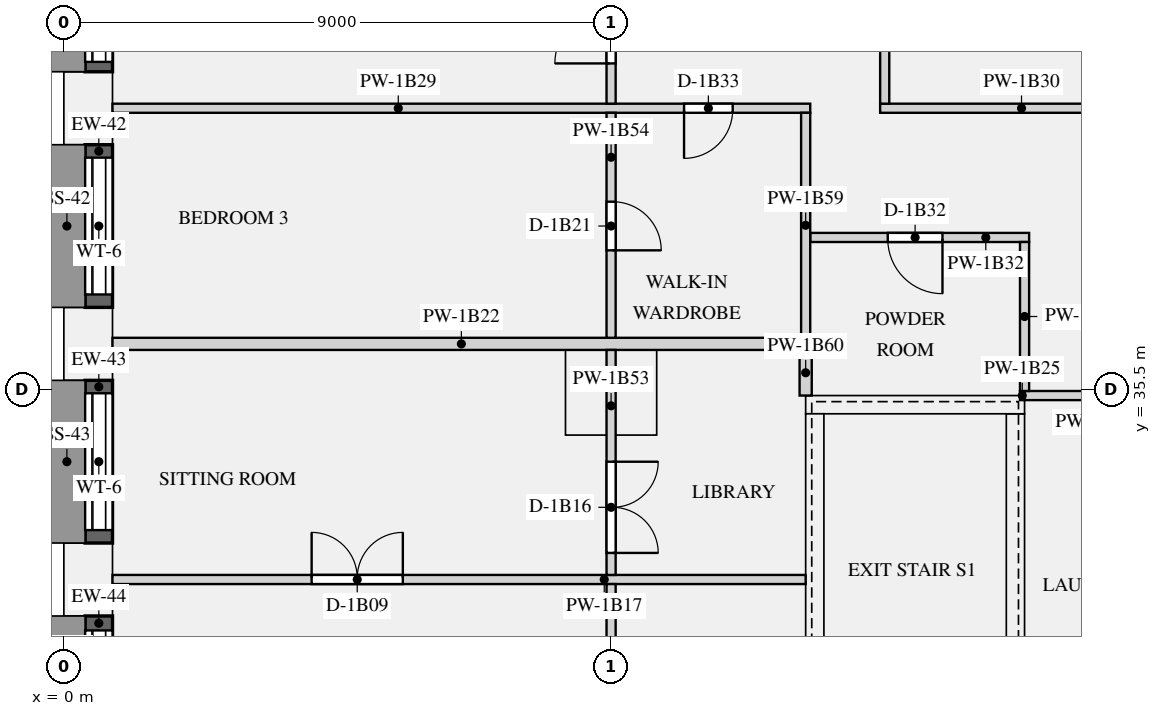
"""IFC4 building model, lengths in metres.
Left out: names, types, materials, properties, quantities, classifications, styles, units other than length and angle.
Written with IfcOpenShell. Run it as: python <this file> out.ifc"""

import sys

from ifc_helpers import new_model, si_unit, direction, frame, frame_2d, origin, origin_2d, place, context, subcontext, project, spatial, rectangle, extrude, element, fill, save


model = new_model("IFC4")
c1 = context("Model", 3, precision=1e-05, world=origin(), true_north=direction((0.0, 1.0)))
c2 = subcontext(c1, "Body", "Model", "MODEL_VIEW")
j1 = project(units=[si_unit("LENGTHUNIT", "METRE"), si_unit("PLANEANGLEUNIT", "RADIAN")], contexts=[c1])
p1 = place(None, origin())
s1 = spatial("IfcSite", under=j1, at=p1, CompositionType="ELEMENT")
p2 = place(p1, origin())
s2 = spatial("IfcBuilding", under=s1, at=p2, CompositionType="ELEMENT")
p3 = place(p2, frame((0.0, 0.0, 28.95)))
s3 = spatial("IfcBuildingStorey", under=s2, at=p3, CompositionType="ELEMENT", Elevation=28.95)
for number, where, z_axis, x_axis in (
    (1, (0.4, 40.125, 0.0), (0.0, 0.0, 1.0), (0.0, -1.0, 0.0)),
    (2, (0.4, 36.25, 0.0), (0.0, 0.0, 1.0), (0.0, -1.0, 0.0)),
    (3, (0.4, 32.375, 0.0), (0.0, 0.0, 1.0), (0.0, -1.0, 0.0)),
):
    element("IfcColumn", number, at=place(p3, frame(where, z_axis=z_axis, x_axis=x_axis)), inside=s3, PredefinedType="USERDEFINED", context=c2, shape_type="SweptSolid", body=[
        extrude(rectangle(XDim=1.2, YDim=0.8, at=origin_2d()), origin(), (0.0, 0.0, 1.0), 3.15),
    ])
p4 = place(p3, frame((9.0, 35.5, 0.0), z_axis=(0.0, 0.0, 1.0), x_axis=(1.0, 0.0, 0.0)))
e4 = element("IfcColumn", 4, at=p4, inside=s3, PredefinedType="COLUMN", context=c2, shape_type="SweptSolid", body=[
    extrude(rectangle(XDim=1.5, YDim=1.5, at=origin_2d()), origin(), (0.0, 0.0, 1.0), 3.15),
])
p5 = place(p3, frame((12.2, 35.25, 0.0), z_axis=(0.0, 0.0, 1.0), x_axis=(1.0, 0.0, 0.0)))
e5 = element("IfcWall", 5, at=p5, inside=s3, PredefinedType="SHEAR", context=c2, shape_type="SweptSolid", body=[
    extrude(rectangle(XDim=3.6, YDim=0.3, at=frame_2d((1.8, 0.0))), origin(), (0.0, 0.0, 1.0), 3.15),
])
for number, where, z_axis, x_axis in (
    (6, (12.35, 27.3, 0.0), (0.0, 0.0, 1.0), (0.0, 1.0, 0.0)),
    (7, (15.65, 27.3, 0.0), (0.0, 0.0, 1.0), (0.0, 1.0, 0.0)),
):
    element("IfcWall", number, at=place(p3, frame(where, z_axis=z_axis, x_axis=x_axis)), inside=s3, PredefinedType="SHEAR", context=c2, shape_type="SweptSolid", body=[
        extrude(rectangle(XDim=7.8, YDim=0.3, at=frame_2d((3.9, 0.0))), origin(), (0.0, 0.0, 1.0), 3.15),
    ])
p6 = place(p3, frame((0.575, 42.8, 0.9), z_axis=(0.0, 0.0, 1.0), x_axis=(0.0, -1.0, 0.0)))
e8 = element("IfcWall", 8, at=p6, inside=s3, PredefinedType="SOLIDWALL", context=c2, shape_type="SweptSolid", body=[
    extrude(rectangle(XDim=2.075, YDim=0.45, at=frame_2d((1.038, 0.0))), origin(), (0.0, 0.0, 1.0), 1.93),
])
p7 = place(p6, frame((0.163, 0.0, 0.15)))
e9 = element("IfcOpeningElement", 9, at=p7, cuts=e8, PredefinedType="OPENING", context=c2, shape_type="SweptSolid", body=[
    extrude(rectangle(XDim=1.75, YDim=1.5, at=frame_2d((0.875, 0.75))), frame((0.0, 0.235, 0.0), z_axis=(0.0, -1.0, 0.0), x_axis=(1.0, 0.0, 0.0)), (0.0, 0.0, 1.0), 0.47),
])
p8 = place(p3, frame((0.575, 39.525, 0.9), z_axis=(0.0, 0.0, 1.0), x_axis=(0.0, -1.0, 0.0)))
e10 = element("IfcWall", 10, at=p8, inside=s3, PredefinedType="SOLIDWALL", context=c2, shape_type="SweptSolid", body=[
    extrude(rectangle(XDim=2.675, YDim=0.45, at=frame_2d((1.337, 0.0))), origin(), (0.0, 0.0, 1.0), 1.93),
])
p9 = place(p8, frame((0.212, 0.0, 0.15)))
e11 = element("IfcOpeningElement", 11, at=p9, cuts=e10, PredefinedType="OPENING", context=c2, shape_type="SweptSolid", body=[
    extrude(rectangle(XDim=2.25, YDim=1.5, at=frame_2d((1.125, 0.75))), frame((0.0, 0.235, 0.0), z_axis=(0.0, -1.0, 0.0), x_axis=(1.0, 0.0, 0.0)), (0.0, 0.0, 1.0), 0.47),
])
p10 = place(p3, frame((0.575, 35.65, 0.9), z_axis=(0.0, 0.0, 1.0), x_axis=(0.0, -1.0, 0.0)))
e12 = element("IfcWall", 12, at=p10, inside=s3, PredefinedType="SOLIDWALL", context=c2, shape_type="SweptSolid", body=[
    extrude(rectangle(XDim=2.675, YDim=0.45, at=frame_2d((1.337, 0.0))), origin(), (0.0, 0.0, 1.0), 1.93),
])
p11 = place(p10, frame((0.212, 0.0, 0.15)))
e13 = element("IfcOpeningElement", 13, at=p11, cuts=e12, PredefinedType="OPENING", context=c2, shape_type="SweptSolid", body=[
    extrude(rectangle(XDim=2.25, YDim=1.5, at=frame_2d((1.125, 0.75))), frame((0.0, 0.235, 0.0), z_axis=(0.0, -1.0, 0.0), x_axis=(1.0, 0.0, 0.0)), (0.0, 0.0, 1.0), 0.47),
])
p12 = place(p3, frame((0.575, 31.775, 0.9), z_axis=(0.0, 0.0, 1.0), x_axis=(0.0, -1.0, 0.0)))
e14 = element("IfcWall", 14, at=p12, inside=s3, PredefinedType="SOLIDWALL", context=c2, shape_type="SweptSolid", body=[
    extrude(rectangle(XDim=2.475, YDim=0.45, at=frame_2d((1.237, 0.0))), origin(), (0.0, 0.0, 1.0), 1.93),
])
p13 = place(p12, frame((0.238, 0.0, 0.15)))
e15 = element("IfcOpeningElement", 15, at=p13, cuts=e14, PredefinedType="OPENING", context=c2, shape_type="SweptSolid", body=[
    extrude(rectangle(XDim=2.0, YDim=1.5, at=frame_2d((1.0, 0.75))), frame((0.0, 0.235, 0.0), z_axis=(0.0, -1.0, 0.0), x_axis=(1.0, 0.0, 0.0)), (0.0, 0.0, 1.0), 0.47),
])
p14 = place(p3, frame((0.8, 32.375, 0.0), z_axis=(0.0, 0.0, 1.0), x_axis=(1.0, 0.0, 0.0)))
e16 = element("IfcWall", 16, at=p14, inside=s3, PredefinedType="PARTITIONING", context=c2, shape_type="SweptSolid", body=[
    extrude(rectangle(XDim=11.4, YDim=0.15, at=frame_2d((5.7, 0.0))), origin(), (0.0, 0.0, 1.0), 2.83),
])
p15 = place(p14, frame((3.275, 0.0, 0.0)))
e17 = element("IfcOpeningElement", 17, at=p15, cuts=e16, PredefinedType="OPENING", context=c2, shape_type="SweptSolid", body=[
    extrude(rectangle(XDim=1.5, YDim=2.1, at=frame_2d((0.75, 1.05))), frame((0.0, 0.085, 0.0), z_axis=(0.0, -1.0, 0.0), x_axis=(1.0, 0.0, 0.0)), (0.0, 0.0, 1.0), 0.17),
])
p16 = place(p3, frame((0.8, 36.25, 0.0), z_axis=(0.0, 0.0, 1.0), x_axis=(1.0, 0.0, 0.0)))
e18 = element("IfcWall", 18, at=p16, inside=s3, PredefinedType="PARTITIONING", context=c2, shape_type="SweptSolid", body=[
    extrude(rectangle(XDim=11.475, YDim=0.2, at=frame_2d((5.737, 0.0))), origin(), (0.0, 0.0, 1.0), 2.83),
])
p17 = place(p3, frame((15.725, 35.4, 0.0), z_axis=(0.0, 0.0, 1.0), x_axis=(1.0, 0.0, 0.0)))
e19 = element("IfcWall", 19, at=p17, inside=s3, PredefinedType="PARTITIONING", context=c2, shape_type="SweptSolid", body=[
    extrude(rectangle(XDim=0.075, YDim=0.15, at=frame_2d((0.038, 0.0))), origin(), (0.0, 0.0, 1.0), 2.83),
])
p18 = place(p3, frame((15.8, 35.4, 0.0), z_axis=(0.0, 0.0, 1.0), x_axis=(1.0, 0.0, 0.0)))
e20 = element("IfcWall", 20, at=p18, inside=s3, PredefinedType="PARTITIONING", context=c2, shape_type="SweptSolid", body=[
    extrude(rectangle(XDim=2.275, YDim=0.15, at=frame_2d((1.137, 0.0))), origin(), (0.0, 0.0, 1.0), 2.83),
])
p19 = place(p3, frame((0.8, 40.125, 0.0), z_axis=(0.0, 0.0, 1.0), x_axis=(1.0, 0.0, 0.0)))
e21 = element("IfcWall", 21, at=p19, inside=s3, PredefinedType="PARTITIONING", context=c2, shape_type="SweptSolid", body=[
    extrude(rectangle(XDim=11.475, YDim=0.15, at=frame_2d((5.737, 0.0))), origin(), (0.0, 0.0, 1.0), 2.83),
])
p20 = place(p19, frame((9.4, 0.0, 0.0)))
e22 = element("IfcOpeningElement", 22, at=p20, cuts=e21, PredefinedType="OPENING", context=c2, shape_type="SweptSolid", body=[
    extrude(rectangle(XDim=0.8, YDim=2.1, at=frame_2d((0.4, 1.05))), frame((0.0, 0.085, 0.0), z_axis=(0.0, -1.0, 0.0), x_axis=(1.0, 0.0, 0.0)), (0.0, 0.0, 1.0), 0.17),
])
p21 = place(p3, frame((13.425, 40.125, 0.0), z_axis=(0.0, 0.0, 1.0), x_axis=(1.0, 0.0, 0.0)))
e23 = element("IfcWall", 23, at=p21, inside=s3, PredefinedType="PARTITIONING", context=c2, shape_type="SweptSolid", body=[
    extrude(rectangle(XDim=4.65, YDim=0.15, at=frame_2d((2.325, 0.0))), origin(), (0.0, 0.0, 1.0), 2.83),
])
p22 = place(p3, frame((12.275, 38.0, 0.0), z_axis=(0.0, 0.0, 1.0), x_axis=(1.0, 0.0, 0.0)))
e24 = element("IfcWall", 24, at=p22, inside=s3, PredefinedType="PARTITIONING", context=c2, shape_type="SweptSolid", body=[
    extrude(rectangle(XDim=3.6, YDim=0.15, at=frame_2d((1.8, 0.0))), origin(), (0.0, 0.0, 1.0), 2.83),
])
p23 = place(p22, frame((1.275, 0.0, 0.0)))
e25 = element("IfcOpeningElement", 25, at=p23, cuts=e24, PredefinedType="OPENING", context=c2, shape_type="SweptSolid", body=[
    extrude(rectangle(XDim=0.9, YDim=2.1, at=frame_2d((0.45, 1.05))), frame((0.0, 0.085, 0.0), z_axis=(0.0, -1.0, 0.0), x_axis=(1.0, 0.0, 0.0)), (0.0, 0.0, 1.0), 0.17),
])
p24 = place(p3, frame((9.0, 24.075, 0.0), z_axis=(0.0, 0.0, 1.0), x_axis=(0.0, 1.0, 0.0)))
e26 = element("IfcWall", 26, at=p24, inside=s3, PredefinedType="PARTITIONING", context=c2, shape_type="SweptSolid", body=[
    extrude(rectangle(XDim=8.225, YDim=0.15, at=frame_2d((4.113, 0.0))), origin(), (0.0, 0.0, 1.0), 2.83),
])
p25 = place(p24, frame((2.1, 0.0, 0.0)))
e27 = element("IfcOpeningElement", 27, at=p25, cuts=e26, PredefinedType="OPENING", context=c2, shape_type="SweptSolid", body=[
    extrude(rectangle(XDim=0.9, YDim=2.1, at=frame_2d((0.45, 1.05))), frame((0.0, 0.085, 0.0), z_axis=(0.0, -1.0, 0.0), x_axis=(1.0, 0.0, 0.0)), (0.0, 0.0, 1.0), 0.17),
])
p26 = place(p3, frame((9.0, 32.45, 0.0), z_axis=(0.0, 0.0, 1.0), x_axis=(0.0, 1.0, 0.0)))
e28 = element("IfcWall", 28, at=p26, inside=s3, PredefinedType="PARTITIONING", context=c2, shape_type="SweptSolid", body=[
    extrude(rectangle(XDim=3.7, YDim=0.15, at=frame_2d((1.85, 0.0))), origin(), (0.0, 0.0, 1.0), 2.83),
])
p27 = place(p26, frame((0.362, 0.0, 0.0)))
e29 = element("IfcOpeningElement", 29, at=p27, cuts=e28, PredefinedType="OPENING", context=c2, shape_type="SweptSolid", body=[
    extrude(rectangle(XDim=1.5, YDim=2.1, at=frame_2d((0.75, 1.05))), frame((0.0, 0.085, 0.0), z_axis=(0.0, -1.0, 0.0), x_axis=(1.0, 0.0, 0.0)), (0.0, 0.0, 1.0), 0.17),
])
p28 = place(p3, frame((9.0, 36.35, 0.0), z_axis=(0.0, 0.0, 1.0), x_axis=(0.0, 1.0, 0.0)))
e30 = element("IfcWall", 30, at=p28, inside=s3, PredefinedType="PARTITIONING", context=c2, shape_type="SweptSolid", body=[
    extrude(rectangle(XDim=3.7, YDim=0.15, at=frame_2d((1.85, 0.0))), origin(), (0.0, 0.0, 1.0), 2.83),
])
p29 = place(p28, frame((1.438, 0.0, 0.0)))
e31 = element("IfcOpeningElement", 31, at=p29, cuts=e30, PredefinedType="OPENING", context=c2, shape_type="SweptSolid", body=[
    extrude(rectangle(XDim=0.8, YDim=2.1, at=frame_2d((0.4, 1.05))), frame((0.0, 0.085, 0.0), z_axis=(0.0, -1.0, 0.0), x_axis=(1.0, 0.0, 0.0)), (0.0, 0.0, 1.0), 0.17),
])
p30 = place(p3, frame((9.0, 40.2, 0.0), z_axis=(0.0, 0.0, 1.0), x_axis=(0.0, 1.0, 0.0)))
e32 = element("IfcWall", 32, at=p30, inside=s3, PredefinedType="PARTITIONING", context=c2, shape_type="SweptSolid", body=[
    extrude(rectangle(XDim=7.5, YDim=0.15, at=frame_2d((3.75, 0.0))), origin(), (0.0, 0.0, 1.0), 2.83),
])
p31 = place(p30, frame((6.075, 0.0, 0.0)))
e33 = element("IfcOpeningElement", 33, at=p31, cuts=e32, PredefinedType="OPENING", context=c2, shape_type="SweptSolid", body=[
    extrude(rectangle(XDim=0.8, YDim=2.1, at=frame_2d((0.4, 1.05))), frame((0.0, 0.085, 0.0), z_axis=(0.0, -1.0, 0.0), x_axis=(1.0, 0.0, 0.0)), (0.0, 0.0, 1.0), 0.17),
])
p32 = place(p30, frame((3.4, 0.0, 0.0)))
e34 = element("IfcOpeningElement", 34, at=p32, cuts=e32, PredefinedType="OPENING", context=c2, shape_type="SweptSolid", body=[
    extrude(rectangle(XDim=0.8, YDim=2.1, at=frame_2d((0.4, 1.05))), frame((0.0, 0.085, 0.0), z_axis=(0.0, -1.0, 0.0), x_axis=(1.0, 0.0, 0.0)), (0.0, 0.0, 1.0), 0.17),
])
p33 = place(p30, frame((0.662, 0.0, 0.0)))
e35 = element("IfcOpeningElement", 35, at=p33, cuts=e32, PredefinedType="OPENING", context=c2, shape_type="SweptSolid", body=[
    extrude(rectangle(XDim=0.9, YDim=2.1, at=frame_2d((0.45, 1.05))), frame((0.0, 0.085, 0.0), z_axis=(0.0, -1.0, 0.0), x_axis=(1.0, 0.0, 0.0)), (0.0, 0.0, 1.0), 0.17),
])
p34 = place(p3, frame((13.5, 40.2, 0.0), z_axis=(0.0, 0.0, 1.0), x_axis=(0.0, 1.0, 0.0)))
e36 = element("IfcWall", 36, at=p34, inside=s3, PredefinedType="PARTITIONING", context=c2, shape_type="SweptSolid", body=[
    extrude(rectangle(XDim=7.5, YDim=0.15, at=frame_2d((3.75, 0.0))), origin(), (0.0, 0.0, 1.0), 2.83),
])
p35 = place(p34, frame((6.075, 0.0, 0.0)))
e37 = element("IfcOpeningElement", 37, at=p35, cuts=e36, PredefinedType="OPENING", context=c2, shape_type="SweptSolid", body=[
    extrude(rectangle(XDim=0.8, YDim=2.1, at=frame_2d((0.4, 1.05))), frame((0.0, 0.085, 0.0), z_axis=(0.0, -1.0, 0.0), x_axis=(1.0, 0.0, 0.0)), (0.0, 0.0, 1.0), 0.17),
])
p36 = place(p34, frame((3.4, 0.0, 0.0)))
e38 = element("IfcOpeningElement", 38, at=p36, cuts=e36, PredefinedType="OPENING", context=c2, shape_type="SweptSolid", body=[
    extrude(rectangle(XDim=0.8, YDim=2.1, at=frame_2d((0.4, 1.05))), frame((0.0, 0.085, 0.0), z_axis=(0.0, -1.0, 0.0), x_axis=(1.0, 0.0, 0.0)), (0.0, 0.0, 1.0), 0.17),
])
p37 = place(p3, frame((12.2, 36.35, 0.0), z_axis=(0.0, 0.0, 1.0), x_axis=(0.0, 1.0, 0.0)))
e39 = element("IfcWall", 39, at=p37, inside=s3, PredefinedType="PARTITIONING", context=c2, shape_type="SweptSolid", body=[
    extrude(rectangle(XDim=3.7, YDim=0.15, at=frame_2d((1.85, 0.0))), origin(), (0.0, 0.0, 1.0), 2.83),
])
p38 = place(p3, frame((12.2, 35.4, 0.0), z_axis=(0.0, 0.0, 1.0), x_axis=(0.0, 1.0, 0.0)))
e40 = element("IfcWall", 40, at=p38, inside=s3, PredefinedType="PARTITIONING", context=c2, shape_type="SweptSolid", body=[
    extrude(rectangle(XDim=0.75, YDim=0.2, at=frame_2d((0.375, 0.0))), origin(), (0.0, 0.0, 1.0), 2.83),
])
p39 = place(p3, frame((15.8, 35.475, 0.0), z_axis=(0.0, 0.0, 1.0), x_axis=(0.0, 1.0, 0.0)))
e41 = element("IfcWall", 41, at=p39, inside=s3, PredefinedType="PARTITIONING", context=c2, shape_type="SweptSolid", body=[
    extrude(rectangle(XDim=2.45, YDim=0.15, at=frame_2d((1.225, 0.0))), origin(), (0.0, 0.0, 1.0), 2.83),
])
p40 = place(p7, origin())
e42 = element("IfcWindow", 42, at=p40, inside=s3, PartitioningType="SINGLE_PANEL", PredefinedType="WINDOW", context=c2, shape_type="SweptSolid", body=[
    extrude(rectangle(XDim=1.75, YDim=1.5, at=frame_2d((0.875, 0.75))), frame((0.0, -0.065, 0.0), z_axis=(0.0, -1.0, 0.0), x_axis=(1.0, 0.0, 0.0)), (0.0, 0.0, 1.0), 0.06),
])
fill(e9, e42)
p41 = place(p9, origin())
e43 = element("IfcWindow", 43, at=p41, inside=s3, PartitioningType="SINGLE_PANEL", PredefinedType="WINDOW", context=c2, shape_type="SweptSolid", body=[
    extrude(rectangle(XDim=2.25, YDim=1.5, at=frame_2d((1.125, 0.75))), frame((0.0, -0.065, 0.0), z_axis=(0.0, -1.0, 0.0), x_axis=(1.0, 0.0, 0.0)), (0.0, 0.0, 1.0), 0.06),
])
fill(e11, e43)
p42 = place(p11, origin())
e44 = element("IfcWindow", 44, at=p42, inside=s3, PartitioningType="SINGLE_PANEL", PredefinedType="WINDOW", context=c2, shape_type="SweptSolid", body=[
    extrude(rectangle(XDim=2.25, YDim=1.5, at=frame_2d((1.125, 0.75))), frame((0.0, -0.065, 0.0), z_axis=(0.0, -1.0, 0.0), x_axis=(1.0, 0.0, 0.0)), (0.0, 0.0, 1.0), 0.06),
])
fill(e13, e44)
p43 = place(p13, origin())
e45 = element("IfcWindow", 45, at=p43, inside=s3, PartitioningType="SINGLE_PANEL", PredefinedType="WINDOW", context=c2, shape_type="SweptSolid", body=[
    extrude(rectangle(XDim=2.0, YDim=1.5, at=frame_2d((1.0, 0.75))), frame((0.0, -0.065, 0.0), z_axis=(0.0, -1.0, 0.0), x_axis=(1.0, 0.0, 0.0)), (0.0, 0.0, 1.0), 0.06),
])
fill(e15, e45)
p44 = place(p15, origin())
e46 = element("IfcDoor", 46, at=p44, inside=s3, OperationType="DOUBLE_DOOR_SINGLE_SWING", PredefinedType="DOOR", context=c2, shape_type="SweptSolid", body=[
    extrude(rectangle(XDim=1.5, YDim=2.1, at=frame_2d((0.75, 1.05))), frame((0.0, 0.025, 0.0), z_axis=(0.0, -1.0, 0.0), x_axis=(1.0, 0.0, 0.0)), (0.0, 0.0, 1.0), 0.05),
])
fill(e17, e46)
p45 = place(p27, frame((1.5, 0.0, 0.0), z_axis=(0.0, 0.0, 1.0), x_axis=(-1.0, 0.0, 0.0)))
e47 = element("IfcDoor", 47, at=p45, inside=s3, OperationType="DOUBLE_DOOR_SINGLE_SWING", PredefinedType="DOOR", context=c2, shape_type="SweptSolid", body=[
    extrude(rectangle(XDim=1.5, YDim=2.1, at=frame_2d((0.75, 1.05))), frame((0.0, 0.025, 0.0), z_axis=(0.0, -1.0, 0.0), x_axis=(1.0, 0.0, 0.0)), (0.0, 0.0, 1.0), 0.05),
])
fill(e29, e47)
p46 = place(p29, frame((0.8, 0.0, 0.0), z_axis=(0.0, 0.0, 1.0), x_axis=(-1.0, 0.0, 0.0)))
e48 = element("IfcDoor", 48, at=p46, inside=s3, OperationType="SINGLE_SWING_RIGHT", PredefinedType="DOOR", context=c2, shape_type="SweptSolid", body=[
    extrude(rectangle(XDim=0.8, YDim=2.1, at=frame_2d((0.4, 1.05))), frame((0.0, 0.025, 0.0), z_axis=(0.0, -1.0, 0.0), x_axis=(1.0, 0.0, 0.0)), (0.0, 0.0, 1.0), 0.05),
])
fill(e31, e48)
p47 = place(p33, origin())
e49 = element("IfcDoor", 49, at=p47, inside=s3, OperationType="SINGLE_SWING_LEFT", PredefinedType="DOOR", context=c2, shape_type="SweptSolid", body=[
    extrude(rectangle(XDim=0.9, YDim=2.1, at=frame_2d((0.45, 1.05))), frame((0.0, 0.025, 0.0), z_axis=(0.0, -1.0, 0.0), x_axis=(1.0, 0.0, 0.0)), (0.0, 0.0, 1.0), 0.05),
])
fill(e35, e49)
p48 = place(p23, frame((0.9, 0.0, 0.0), z_axis=(0.0, 0.0, 1.0), x_axis=(-1.0, 0.0, 0.0)))
e50 = element("IfcDoor", 50, at=p48, inside=s3, OperationType="SINGLE_SWING_LEFT", PredefinedType="DOOR", context=c2, shape_type="SweptSolid", body=[
    extrude(rectangle(XDim=0.9, YDim=2.1, at=frame_2d((0.45, 1.05))), frame((0.0, 0.025, 0.0), z_axis=(0.0, -1.0, 0.0), x_axis=(1.0, 0.0, 0.0)), (0.0, 0.0, 1.0), 0.05),
])
fill(e25, e50)
p49 = place(p20, frame((0.8, 0.0, 0.0), z_axis=(0.0, 0.0, 1.0), x_axis=(-1.0, 0.0, 0.0)))
e51 = element("IfcDoor", 51, at=p49, inside=s3, OperationType="SINGLE_SWING_RIGHT", PredefinedType="DOOR", context=c2, shape_type="SweptSolid", body=[
    extrude(rectangle(XDim=0.8, YDim=2.1, at=frame_2d((0.4, 1.05))), frame((0.0, 0.025, 0.0), z_axis=(0.0, -1.0, 0.0), x_axis=(1.0, 0.0, 0.0)), (0.0, 0.0, 1.0), 0.05),
])
fill(e22, e51)
save(model, sys.argv[1])
